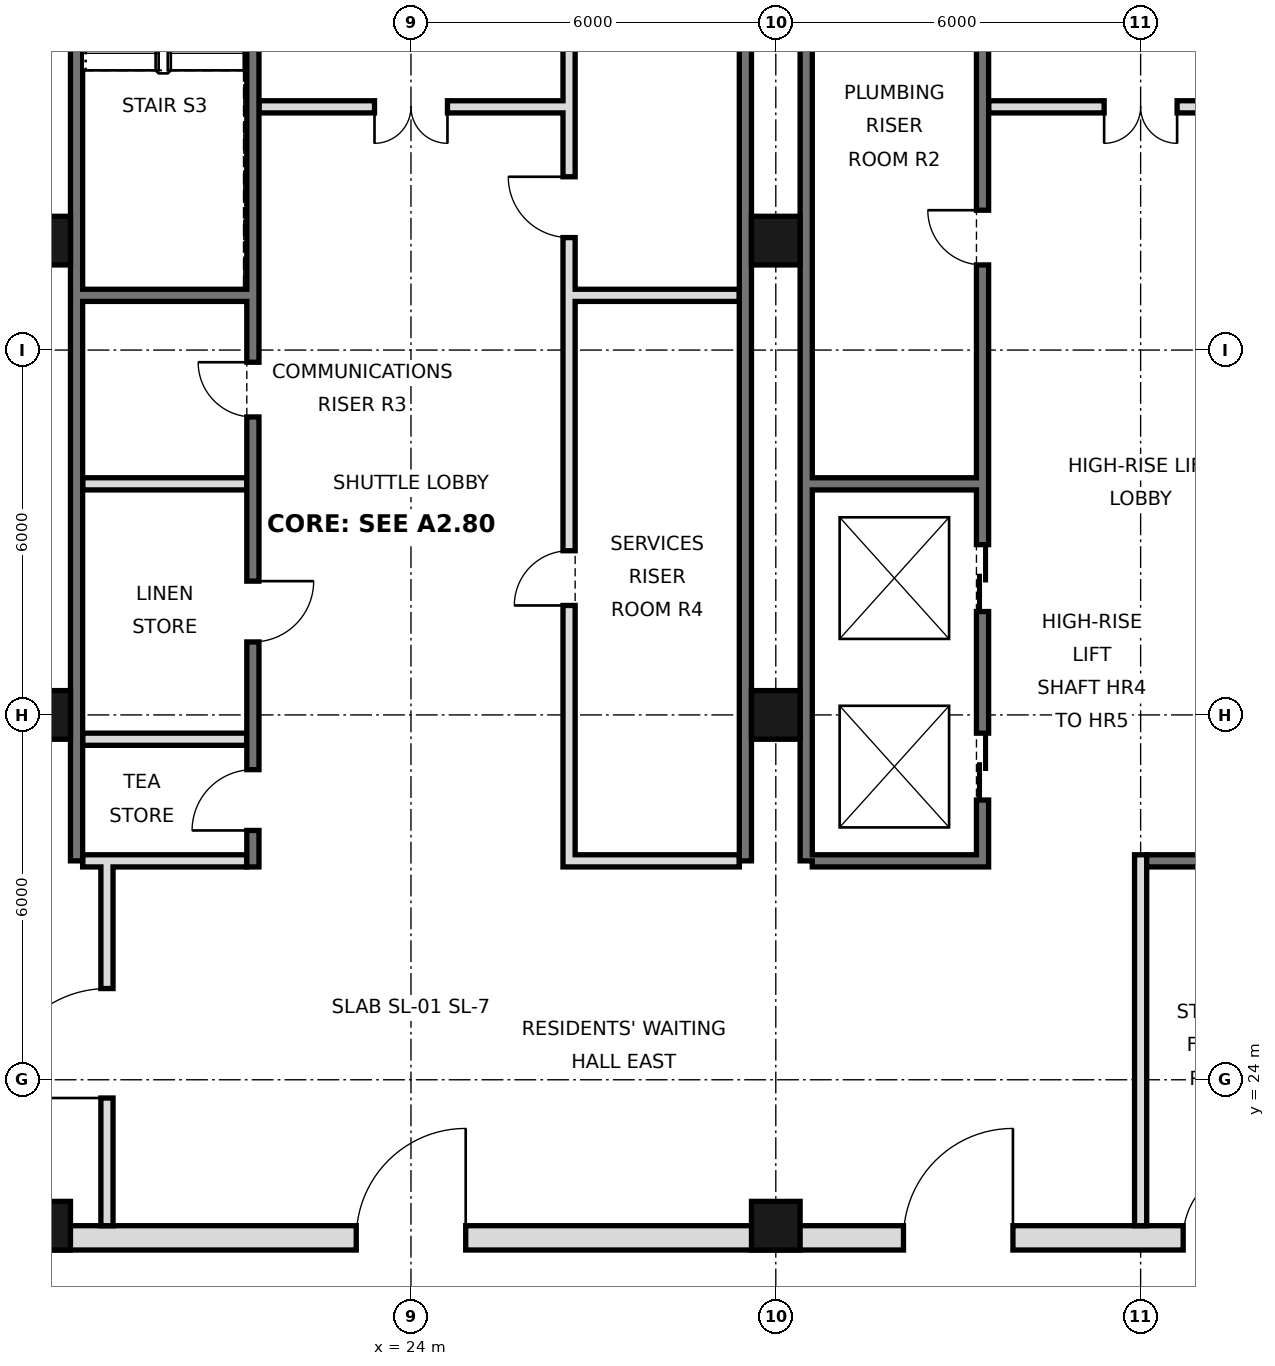
"""IFC4 building model, lengths in metres.
Left out: names, types, materials, properties, quantities, classifications, styles, units other than length and angle.
Written with IfcOpenShell. Run it as: python <this file> out.ifc"""

import sys

from ifc_helpers import new_model, si_unit, direction, frame, frame_2d, origin, origin_2d, place, context, subcontext, project, spatial, rectangle, hollow_rectangle, extrude, element, fill, save


model = new_model("IFC4")
c1 = context("Model", 3, precision=1e-05, world=origin(), true_north=direction((0.0, 1.0)))
c2 = subcontext(c1, "Body", "Model", "MODEL_VIEW")
j1 = project(units=[si_unit("LENGTHUNIT", "METRE"), si_unit("PLANEANGLEUNIT", "RADIAN")], contexts=[c1])
p1 = place(None, origin())
s1 = spatial("IfcSite", under=j1, at=p1, CompositionType="ELEMENT")
p2 = place(p1, origin())
s2 = spatial("IfcBuilding", under=s1, at=p2, CompositionType="ELEMENT")
p3 = place(p2, frame((0.0, 0.0, 319.6)))
s3 = spatial("IfcBuildingStorey", under=s2, at=p3, CompositionType="ELEMENT", Elevation=319.6)
for number, where, z_axis, x_axis in (
    (1, (18.0, 21.6, 0.0), (0.0, 0.0, 1.0), (1.0, 0.0, 0.0)),
    (2, (18.0, 30.0, 0.0), (0.0, 0.0, 1.0), (1.0, 0.0, 0.0)),
    (3, (18.0, 37.8, 0.0), (0.0, 0.0, 1.0), (1.0, 0.0, 0.0)),
    (4, (30.0, 21.6, 0.0), (0.0, 0.0, 1.0), (1.0, 0.0, 0.0)),
    (5, (30.0, 30.0, 0.0), (0.0, 0.0, 1.0), (1.0, 0.0, 0.0)),
    (6, (30.0, 37.8, 0.0), (0.0, 0.0, 1.0), (1.0, 0.0, 0.0)),
):
    element("IfcColumn", number, at=place(p3, frame(where, z_axis=z_axis, x_axis=x_axis)), inside=s3, PredefinedType="COLUMN", context=c2, shape_type="SweptSolid", body=[
        extrude(hollow_rectangle(XDim=0.8, YDim=0.8, WallThickness=0.025, at=origin_2d()), origin(), (0.0, 0.0, 1.0), 3.6),
    ])
for number, where, z_axis, x_axis in (
    (7, (18.5, 27.6, 0.0), (0.0, 0.0, 1.0), (0.0, 1.0, 0.0)),
    (8, (29.5, 27.6, 0.0), (0.0, 0.0, 1.0), (0.0, 1.0, 0.0)),
    (9, (30.5, 27.6, 0.0), (0.0, 0.0, 1.0), (0.0, 1.0, 0.0)),
):
    element("IfcWall", number, at=place(p3, frame(where, z_axis=z_axis, x_axis=x_axis)), inside=s3, PredefinedType="SOLIDWALL", context=c2, shape_type="SweptSolid", body=[
        extrude(rectangle(XDim=17.5, YDim=0.2, at=frame_2d((8.75, 0.0))), origin(), (0.0, 0.0, 1.0), 3.42),
    ])
p4 = place(p3, frame((5.6, 21.4, 0.0), z_axis=(0.0, 0.0, 1.0), x_axis=(1.0, 0.0, 0.0)))
e10 = element("IfcWall", 10, at=p4, inside=s3, PredefinedType="SOLIDWALL", context=c2, shape_type="SweptSolid", body=[
    extrude(rectangle(XDim=36.8, YDim=0.4, at=frame_2d((18.4, 0.0))), origin(), (0.0, 0.0, 1.0), 3.42),
])
p5 = place(p4, frame((8.5, 0.0, 0.0)))
e11 = element("IfcOpeningElement", 11, at=p5, cuts=e10, PredefinedType="OPENING", context=c2, shape_type="SweptSolid", body=[
    extrude(rectangle(XDim=1.8, YDim=2.1, at=frame_2d((0.9, 1.05))), frame((0.0, 0.21, 0.0), z_axis=(0.0, -1.0, 0.0), x_axis=(1.0, 0.0, 0.0)), (0.0, 0.0, 1.0), 0.42),
])
p6 = place(p4, frame((17.5, 0.0, 0.0)))
e12 = element("IfcOpeningElement", 12, at=p6, cuts=e10, PredefinedType="OPENING", context=c2, shape_type="SweptSolid", body=[
    extrude(rectangle(XDim=1.8, YDim=2.1, at=frame_2d((0.9, 1.05))), frame((0.0, 0.21, 0.0), z_axis=(0.0, -1.0, 0.0), x_axis=(1.0, 0.0, 0.0)), (0.0, 0.0, 1.0), 0.42),
])
p7 = place(p4, frame((26.5, 0.0, 0.0)))
e13 = element("IfcOpeningElement", 13, at=p7, cuts=e10, PredefinedType="OPENING", context=c2, shape_type="SweptSolid", body=[
    extrude(rectangle(XDim=1.8, YDim=2.1, at=frame_2d((0.9, 1.05))), frame((0.0, 0.21, 0.0), z_axis=(0.0, -1.0, 0.0), x_axis=(1.0, 0.0, 0.0)), (0.0, 0.0, 1.0), 0.42),
])
p8 = place(p4, frame((4.5, 0.0, 0.0)))
e14 = element("IfcOpeningElement", 14, at=p8, cuts=e10, PredefinedType="OPENING", context=c2, shape_type="SweptSolid", body=[
    extrude(rectangle(XDim=1.2, YDim=2.1, at=frame_2d((0.6, 1.05))), frame((0.0, 0.21, 0.0), z_axis=(0.0, -1.0, 0.0), x_axis=(1.0, 0.0, 0.0)), (0.0, 0.0, 1.0), 0.42),
])
p9 = place(p4, frame((31.1, 0.0, 0.0)))
e15 = element("IfcOpeningElement", 15, at=p9, cuts=e10, PredefinedType="OPENING", context=c2, shape_type="SweptSolid", body=[
    extrude(rectangle(XDim=1.2, YDim=2.1, at=frame_2d((0.6, 1.05))), frame((0.0, 0.21, 0.0), z_axis=(0.0, -1.0, 0.0), x_axis=(1.0, 0.0, 0.0)), (0.0, 0.0, 1.0), 0.42),
])
p10 = place(p3, frame((19.0, 21.6, 0.0), z_axis=(0.0, 0.0, 1.0), x_axis=(0.0, 1.0, 0.0)))
e16 = element("IfcWall", 16, at=p10, inside=s3, PredefinedType="PARTITIONING", context=c2, shape_type="SweptSolid", body=[
    extrude(rectangle(XDim=6.0, YDim=0.2, at=frame_2d((3.0, 0.0))), origin(), (0.0, 0.0, 1.0), 3.42),
])
p11 = place(p10, frame((2.1, 0.0, 0.0)))
e17 = element("IfcOpeningElement", 17, at=p11, cuts=e16, PredefinedType="OPENING", context=c2, shape_type="SweptSolid", body=[
    extrude(rectangle(XDim=1.8, YDim=2.1, at=frame_2d((0.9, 1.05))), frame((0.0, 0.11, 0.0), z_axis=(0.0, -1.0, 0.0), x_axis=(1.0, 0.0, 0.0)), (0.0, 0.0, 1.0), 0.22),
])
p12 = place(p3, frame((21.4, 27.5, 0.0), z_axis=(0.0, 0.0, 1.0), x_axis=(0.0, 1.0, 0.0)))
e18 = element("IfcWall", 18, at=p12, inside=s3, PredefinedType="SOLIDWALL", context=c2, shape_type="SweptSolid", body=[
    extrude(rectangle(XDim=17.5, YDim=0.2, at=frame_2d((8.75, 0.0))), origin(), (0.0, 0.0, 1.0), 3.42),
])
p13 = place(p12, frame((0.6, 0.0, 0.0)))
e19 = element("IfcOpeningElement", 19, at=p13, cuts=e18, PredefinedType="OPENING", context=c2, shape_type="SweptSolid", body=[
    extrude(rectangle(XDim=1.0, YDim=2.1, at=frame_2d((0.5, 1.05))), frame((0.0, 0.11, 0.0), z_axis=(0.0, -1.0, 0.0), x_axis=(1.0, 0.0, 0.0)), (0.0, 0.0, 1.0), 0.22),
])
p14 = place(p12, frame((3.7, 0.0, 0.0)))
e20 = element("IfcOpeningElement", 20, at=p14, cuts=e18, PredefinedType="OPENING", context=c2, shape_type="SweptSolid", body=[
    extrude(rectangle(XDim=1.0, YDim=2.1, at=frame_2d((0.5, 1.05))), frame((0.0, 0.11, 0.0), z_axis=(0.0, -1.0, 0.0), x_axis=(1.0, 0.0, 0.0)), (0.0, 0.0, 1.0), 0.22),
])
p15 = place(p12, frame((16.2, 0.0, 0.0)))
e21 = element("IfcOpeningElement", 21, at=p15, cuts=e18, PredefinedType="OPENING", context=c2, shape_type="SweptSolid", body=[
    extrude(rectangle(XDim=1.0, YDim=2.1, at=frame_2d((0.5, 1.05))), frame((0.0, 0.11, 0.0), z_axis=(0.0, -1.0, 0.0), x_axis=(1.0, 0.0, 0.0)), (0.0, 0.0, 1.0), 0.22),
])
p16 = place(p12, frame((7.4, 0.0, 0.0)))
e22 = element("IfcOpeningElement", 22, at=p16, cuts=e18, PredefinedType="OPENING", context=c2, shape_type="SweptSolid", body=[
    extrude(rectangle(XDim=0.9, YDim=2.1, at=frame_2d((0.45, 1.05))), frame((0.0, 0.11, 0.0), z_axis=(0.0, -1.0, 0.0), x_axis=(1.0, 0.0, 0.0)), (0.0, 0.0, 1.0), 0.22),
])
p17 = place(p3, frame((26.6, 27.5, 0.0), z_axis=(0.0, 0.0, 1.0), x_axis=(0.0, 1.0, 0.0)))
e23 = element("IfcWall", 23, at=p17, inside=s3, PredefinedType="SOLIDWALL", context=c2, shape_type="SweptSolid", body=[
    extrude(rectangle(XDim=17.5, YDim=0.2, at=frame_2d((8.75, 0.0))), origin(), (0.0, 0.0, 1.0), 3.42),
])
p18 = place(p17, frame((4.3, 0.0, 0.0)))
e24 = element("IfcOpeningElement", 24, at=p18, cuts=e23, PredefinedType="OPENING", context=c2, shape_type="SweptSolid", body=[
    extrude(rectangle(XDim=0.9, YDim=2.1, at=frame_2d((0.45, 1.05))), frame((0.0, 0.11, 0.0), z_axis=(0.0, -1.0, 0.0), x_axis=(1.0, 0.0, 0.0)), (0.0, 0.0, 1.0), 0.22),
])
p19 = place(p17, frame((10.35, 0.0, 0.0)))
e25 = element("IfcOpeningElement", 25, at=p19, cuts=e23, PredefinedType="OPENING", context=c2, shape_type="SweptSolid", body=[
    extrude(rectangle(XDim=1.0, YDim=2.1, at=frame_2d((0.5, 1.05))), frame((0.0, 0.11, 0.0), z_axis=(0.0, -1.0, 0.0), x_axis=(1.0, 0.0, 0.0)), (0.0, 0.0, 1.0), 0.22),
])
p20 = place(p3, frame((33.4, 27.5, 0.0), z_axis=(0.0, 0.0, 1.0), x_axis=(0.0, 1.0, 0.0)))
e26 = element("IfcWall", 26, at=p20, inside=s3, PredefinedType="SOLIDWALL", context=c2, shape_type="SweptSolid", body=[
    extrude(rectangle(XDim=17.5, YDim=0.2, at=frame_2d((8.75, 0.0))), origin(), (0.0, 0.0, 1.0), 3.42),
])
p21 = place(p20, frame((1.1, 0.0, 0.0)))
e27 = element("IfcOpeningElement", 27, at=p21, cuts=e26, PredefinedType="OPENING", context=c2, shape_type="SweptSolid", body=[
    extrude(rectangle(XDim=1.1, YDim=2.1, at=frame_2d((0.55, 1.05))), frame((0.0, 0.11, 0.0), z_axis=(0.0, -1.0, 0.0), x_axis=(1.0, 0.0, 0.0)), (0.0, 0.0, 1.0), 0.22),
])
p22 = place(p20, frame((4.2, 0.0, 0.0)))
e28 = element("IfcOpeningElement", 28, at=p22, cuts=e26, PredefinedType="OPENING", context=c2, shape_type="SweptSolid", body=[
    extrude(rectangle(XDim=1.1, YDim=2.1, at=frame_2d((0.55, 1.05))), frame((0.0, 0.11, 0.0), z_axis=(0.0, -1.0, 0.0), x_axis=(1.0, 0.0, 0.0)), (0.0, 0.0, 1.0), 0.22),
])
p23 = place(p20, frame((15.4, 0.0, 0.0)))
e29 = element("IfcOpeningElement", 29, at=p23, cuts=e26, PredefinedType="OPENING", context=c2, shape_type="SweptSolid", body=[
    extrude(rectangle(XDim=1.1, YDim=2.1, at=frame_2d((0.55, 1.05))), frame((0.0, 0.11, 0.0), z_axis=(0.0, -1.0, 0.0), x_axis=(1.0, 0.0, 0.0)), (0.0, 0.0, 1.0), 0.22),
])
p24 = place(p20, frame((9.9, 0.0, 0.0)))
e30 = element("IfcOpeningElement", 30, at=p24, cuts=e26, PredefinedType="OPENING", context=c2, shape_type="SweptSolid", body=[
    extrude(rectangle(XDim=0.9, YDim=2.1, at=frame_2d((0.45, 1.05))), frame((0.0, 0.11, 0.0), z_axis=(0.0, -1.0, 0.0), x_axis=(1.0, 0.0, 0.0)), (0.0, 0.0, 1.0), 0.22),
])
p25 = place(p3, frame((36.0, 21.6, 0.0), z_axis=(0.0, 0.0, 1.0), x_axis=(0.0, 1.0, 0.0)))
e31 = element("IfcWall", 31, at=p25, inside=s3, PredefinedType="PARTITIONING", context=c2, shape_type="SweptSolid", body=[
    extrude(rectangle(XDim=6.1, YDim=0.2, at=frame_2d((3.05, 0.0))), origin(), (0.0, 0.0, 1.0), 3.42),
])
p26 = place(p3, frame((18.6, 27.6, 0.0), z_axis=(0.0, 0.0, 1.0), x_axis=(1.0, 0.0, 0.0)))
e32 = element("IfcWall", 32, at=p26, inside=s3, PredefinedType="PARTITIONING", context=c2, shape_type="SweptSolid", body=[
    extrude(rectangle(XDim=2.7, YDim=0.2, at=frame_2d((1.35, 0.0))), origin(), (0.0, 0.0, 1.0), 3.42),
])
for number, where, z_axis, x_axis in (
    (33, (26.7, 27.6, 0.0), (0.0, 0.0, 1.0), (1.0, 0.0, 0.0)),
    (34, (30.6, 27.6, 0.0), (0.0, 0.0, 1.0), (1.0, 0.0, 0.0)),
):
    element("IfcWall", number, at=place(p3, frame(where, z_axis=z_axis, x_axis=x_axis)), inside=s3, PredefinedType="SOLIDWALL", context=c2, shape_type="SweptSolid", body=[
        extrude(rectangle(XDim=2.7, YDim=0.2, at=frame_2d((1.35, 0.0))), origin(), (0.0, 0.0, 1.0), 3.42),
    ])
p27 = place(p3, frame((36.1, 27.6, 0.0), z_axis=(0.0, 0.0, 1.0), x_axis=(1.0, 0.0, 0.0)))
e35 = element("IfcWall", 35, at=p27, inside=s3, PredefinedType="SOLIDWALL", context=c2, shape_type="SweptSolid", body=[
    extrude(rectangle(XDim=5.3, YDim=0.2, at=frame_2d((2.65, 0.0))), origin(), (0.0, 0.0, 1.0), 3.42),
])
p28 = place(p3, frame((18.6, 29.6, 0.0), z_axis=(0.0, 0.0, 1.0), x_axis=(1.0, 0.0, 0.0)))
e36 = element("IfcWall", 36, at=p28, inside=s3, PredefinedType="PARTITIONING", context=c2, shape_type="SweptSolid", body=[
    extrude(rectangle(XDim=2.7, YDim=0.2, at=frame_2d((1.35, 0.0))), origin(), (0.0, 0.0, 1.0), 3.42),
])
for number, where, z_axis, x_axis in (
    (37, (18.6, 33.8, 0.0), (0.0, 0.0, 1.0), (1.0, 0.0, 0.0)),
    (38, (30.6, 33.8, 0.0), (0.0, 0.0, 1.0), (1.0, 0.0, 0.0)),
    (39, (18.6, 36.9, 0.0), (0.0, 0.0, 1.0), (1.0, 0.0, 0.0)),
    (40, (26.7, 36.9, 0.0), (0.0, 0.0, 1.0), (1.0, 0.0, 0.0)),
):
    element("IfcWall", number, at=place(p3, frame(where, z_axis=z_axis, x_axis=x_axis)), inside=s3, PredefinedType="SOLIDWALL", context=c2, shape_type="SweptSolid", body=[
        extrude(rectangle(XDim=2.7, YDim=0.2, at=frame_2d((1.35, 0.0))), origin(), (0.0, 0.0, 1.0), 3.42),
    ])
p29 = place(p3, frame((21.5, 40.0, 0.0), z_axis=(0.0, 0.0, 1.0), x_axis=(1.0, 0.0, 0.0)))
e41 = element("IfcWall", 41, at=p29, inside=s3, PredefinedType="PARTITIONING", context=c2, shape_type="SweptSolid", body=[
    extrude(rectangle(XDim=5.0, YDim=0.2, at=frame_2d((2.5, 0.0))), origin(), (0.0, 0.0, 1.0), 3.42),
])
p30 = place(p29, frame((1.9, 0.0, 0.0)))
e42 = element("IfcOpeningElement", 42, at=p30, cuts=e41, PredefinedType="OPENING", context=c2, shape_type="SweptSolid", body=[
    extrude(rectangle(XDim=1.2, YDim=2.1, at=frame_2d((0.6, 1.05))), frame((0.0, 0.11, 0.0), z_axis=(0.0, -1.0, 0.0), x_axis=(1.0, 0.0, 0.0)), (0.0, 0.0, 1.0), 0.22),
])
p31 = place(p3, frame((33.5, 40.0, 0.0), z_axis=(0.0, 0.0, 1.0), x_axis=(1.0, 0.0, 0.0)))
e43 = element("IfcWall", 43, at=p31, inside=s3, PredefinedType="PARTITIONING", context=c2, shape_type="SweptSolid", body=[
    extrude(rectangle(XDim=5.0, YDim=0.2, at=frame_2d((2.5, 0.0))), origin(), (0.0, 0.0, 1.0), 3.42),
])
p32 = place(p31, frame((1.9, 0.0, 0.0)))
e44 = element("IfcOpeningElement", 44, at=p32, cuts=e43, PredefinedType="OPENING", context=c2, shape_type="SweptSolid", body=[
    extrude(rectangle(XDim=1.2, YDim=2.1, at=frame_2d((0.6, 1.05))), frame((0.0, 0.11, 0.0), z_axis=(0.0, -1.0, 0.0), x_axis=(1.0, 0.0, 0.0)), (0.0, 0.0, 1.0), 0.22),
])
p33 = place(p11, origin())
e45 = element("IfcDoor", 45, at=p33, inside=s3, OperationType="SINGLE_SWING_LEFT", PredefinedType="DOOR", context=c2, shape_type="SweptSolid", body=[
    extrude(rectangle(XDim=1.8, YDim=2.1, at=frame_2d((0.9, 1.05))), frame((0.0, 0.025, 0.0), z_axis=(0.0, -1.0, 0.0), x_axis=(1.0, 0.0, 0.0)), (0.0, 0.0, 1.0), 0.05),
])
fill(e17, e45)
p34 = place(p6, frame((1.8, 0.0, 0.0), z_axis=(0.0, 0.0, 1.0), x_axis=(-1.0, 0.0, 0.0)))
e46 = element("IfcDoor", 46, at=p34, inside=s3, OperationType="SINGLE_SWING_LEFT", PredefinedType="DOOR", context=c2, shape_type="SweptSolid", body=[
    extrude(rectangle(XDim=1.8, YDim=2.1, at=frame_2d((0.9, 1.05))), frame((0.0, 0.025, 0.0), z_axis=(0.0, -1.0, 0.0), x_axis=(1.0, 0.0, 0.0)), (0.0, 0.0, 1.0), 0.05),
])
fill(e12, e46)
p35 = place(p7, frame((1.8, 0.0, 0.0), z_axis=(0.0, 0.0, 1.0), x_axis=(-1.0, 0.0, 0.0)))
e47 = element("IfcDoor", 47, at=p35, inside=s3, OperationType="SINGLE_SWING_LEFT", PredefinedType="DOOR", context=c2, shape_type="SweptSolid", body=[
    extrude(rectangle(XDim=1.8, YDim=2.1, at=frame_2d((0.9, 1.05))), frame((0.0, 0.025, 0.0), z_axis=(0.0, -1.0, 0.0), x_axis=(1.0, 0.0, 0.0)), (0.0, 0.0, 1.0), 0.05),
])
fill(e13, e47)
p36 = place(p9, frame((1.2, 0.0, 0.0), z_axis=(0.0, 0.0, 1.0), x_axis=(-1.0, 0.0, 0.0)))
e48 = element("IfcDoor", 48, at=p36, inside=s3, OperationType="SINGLE_SWING_LEFT", PredefinedType="DOOR", context=c2, shape_type="SweptSolid", body=[
    extrude(rectangle(XDim=1.2, YDim=2.1, at=frame_2d((0.6, 1.05))), frame((0.0, 0.025, 0.0), z_axis=(0.0, -1.0, 0.0), x_axis=(1.0, 0.0, 0.0)), (0.0, 0.0, 1.0), 0.05),
])
fill(e15, e48)
p37 = place(p30, frame((1.2, 0.0, 0.0), z_axis=(0.0, 0.0, 1.0), x_axis=(-1.0, 0.0, 0.0)))
e49 = element("IfcDoor", 49, at=p37, inside=s3, OperationType="DOUBLE_DOOR_SINGLE_SWING", PredefinedType="DOOR", context=c2, shape_type="SweptSolid", body=[
    extrude(rectangle(XDim=1.2, YDim=2.1, at=frame_2d((0.6, 1.05))), frame((0.0, 0.025, 0.0), z_axis=(0.0, -1.0, 0.0), x_axis=(1.0, 0.0, 0.0)), (0.0, 0.0, 1.0), 0.05),
])
fill(e42, e49)
p38 = place(p32, frame((1.2, 0.0, 0.0), z_axis=(0.0, 0.0, 1.0), x_axis=(-1.0, 0.0, 0.0)))
e50 = element("IfcDoor", 50, at=p38, inside=s3, OperationType="DOUBLE_DOOR_SINGLE_SWING", PredefinedType="DOOR", context=c2, shape_type="SweptSolid", body=[
    extrude(rectangle(XDim=1.2, YDim=2.1, at=frame_2d((0.6, 1.05))), frame((0.0, 0.025, 0.0), z_axis=(0.0, -1.0, 0.0), x_axis=(1.0, 0.0, 0.0)), (0.0, 0.0, 1.0), 0.05),
])
fill(e44, e50)
p39 = place(p21, origin())
e51 = element("IfcDoor", 51, at=p39, inside=s3, OperationType="DOUBLE_DOOR_SLIDING", PredefinedType="DOOR", context=c2, shape_type="SweptSolid", body=[
    extrude(rectangle(XDim=1.1, YDim=2.1, at=frame_2d((0.55, 1.05))), frame((0.0, 0.025, 0.0), z_axis=(0.0, -1.0, 0.0), x_axis=(1.0, 0.0, 0.0)), (0.0, 0.0, 1.0), 0.05),
])
fill(e27, e51)
p40 = place(p22, origin())
e52 = element("IfcDoor", 52, at=p40, inside=s3, OperationType="DOUBLE_DOOR_SLIDING", PredefinedType="DOOR", context=c2, shape_type="SweptSolid", body=[
    extrude(rectangle(XDim=1.1, YDim=2.1, at=frame_2d((0.55, 1.05))), frame((0.0, 0.025, 0.0), z_axis=(0.0, -1.0, 0.0), x_axis=(1.0, 0.0, 0.0)), (0.0, 0.0, 1.0), 0.05),
])
fill(e28, e52)
p41 = place(p13, origin())
e53 = element("IfcDoor", 53, at=p41, inside=s3, OperationType="SINGLE_SWING_LEFT", PredefinedType="DOOR", context=c2, shape_type="SweptSolid", body=[
    extrude(rectangle(XDim=1.0, YDim=2.1, at=frame_2d((0.5, 1.05))), frame((0.0, 0.025, 0.0), z_axis=(0.0, -1.0, 0.0), x_axis=(1.0, 0.0, 0.0)), (0.0, 0.0, 1.0), 0.05),
])
fill(e19, e53)
p42 = place(p14, origin())
e54 = element("IfcDoor", 54, at=p42, inside=s3, OperationType="SINGLE_SWING_RIGHT", PredefinedType="DOOR", context=c2, shape_type="SweptSolid", body=[
    extrude(rectangle(XDim=1.0, YDim=2.1, at=frame_2d((0.5, 1.05))), frame((0.0, 0.025, 0.0), z_axis=(0.0, -1.0, 0.0), x_axis=(1.0, 0.0, 0.0)), (0.0, 0.0, 1.0), 0.05),
])
fill(e20, e54)
p43 = place(p24, frame((0.9, 0.0, 0.0), z_axis=(0.0, 0.0, 1.0), x_axis=(-1.0, 0.0, 0.0)))
e55 = element("IfcDoor", 55, at=p43, inside=s3, OperationType="SINGLE_SWING_LEFT", PredefinedType="DOOR", context=c2, shape_type="SweptSolid", body=[
    extrude(rectangle(XDim=0.9, YDim=2.1, at=frame_2d((0.45, 1.05))), frame((0.0, 0.025, 0.0), z_axis=(0.0, -1.0, 0.0), x_axis=(1.0, 0.0, 0.0)), (0.0, 0.0, 1.0), 0.05),
])
fill(e30, e55)
p44 = place(p16, frame((0.9, 0.0, 0.0), z_axis=(0.0, 0.0, 1.0), x_axis=(-1.0, 0.0, 0.0)))
e56 = element("IfcDoor", 56, at=p44, inside=s3, OperationType="SINGLE_SWING_LEFT", PredefinedType="DOOR", context=c2, shape_type="SweptSolid", body=[
    extrude(rectangle(XDim=0.9, YDim=2.1, at=frame_2d((0.45, 1.05))), frame((0.0, 0.025, 0.0), z_axis=(0.0, -1.0, 0.0), x_axis=(1.0, 0.0, 0.0)), (0.0, 0.0, 1.0), 0.05),
])
fill(e22, e56)
p45 = place(p18, origin())
e57 = element("IfcDoor", 57, at=p45, inside=s3, OperationType="SINGLE_SWING_LEFT", PredefinedType="DOOR", context=c2, shape_type="SweptSolid", body=[
    extrude(rectangle(XDim=0.9, YDim=2.1, at=frame_2d((0.45, 1.05))), frame((0.0, 0.025, 0.0), z_axis=(0.0, -1.0, 0.0), x_axis=(1.0, 0.0, 0.0)), (0.0, 0.0, 1.0), 0.05),
])
fill(e24, e57)
p46 = place(p19, frame((1.0, 0.0, 0.0), z_axis=(0.0, 0.0, 1.0), x_axis=(-1.0, 0.0, 0.0)))
e58 = element("IfcDoor", 58, at=p46, inside=s3, OperationType="SINGLE_SWING_LEFT", PredefinedType="DOOR", context=c2, shape_type="SweptSolid", body=[
    extrude(rectangle(XDim=1.0, YDim=2.1, at=frame_2d((0.5, 1.05))), frame((0.0, 0.025, 0.0), z_axis=(0.0, -1.0, 0.0), x_axis=(1.0, 0.0, 0.0)), (0.0, 0.0, 1.0), 0.05),
])
fill(e25, e58)
save(model, sys.argv[1])
